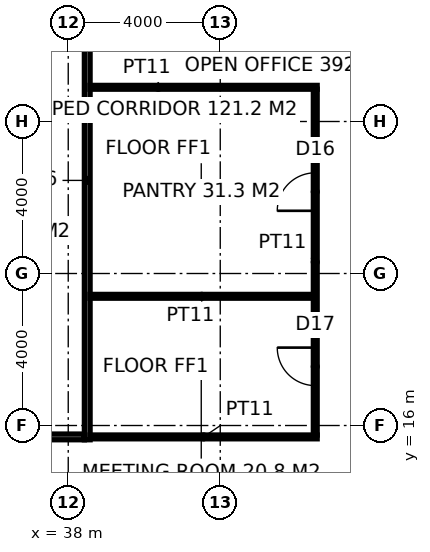
"""IFC4 building model, lengths in metres.
Left out: names, types, materials, properties, quantities, classifications, styles, units other than length and angle.
Written with IfcOpenShell. Run it as: python <this file> out.ifc"""

import sys

from ifc_helpers import new_model, si_unit, direction, frame, frame_2d, origin, place, context, subcontext, project, spatial, rectangle, extrude, element, fill, save


model = new_model("IFC4")
c1 = context("Model", 3, precision=1e-05, world=origin(), true_north=direction((0.0, 1.0)))
c2 = subcontext(c1, "Body", "Model", "MODEL_VIEW")
j1 = project(units=[si_unit("LENGTHUNIT", "METRE"), si_unit("PLANEANGLEUNIT", "RADIAN")], contexts=[c1])
p1 = place(None, origin())
s1 = spatial("IfcSite", under=j1, at=p1, CompositionType="ELEMENT")
p2 = place(p1, origin())
s2 = spatial("IfcBuilding", under=s1, at=p2, CompositionType="ELEMENT")
p3 = place(p2, frame((0.0, 0.0, 242.2)))
s3 = spatial("IfcBuildingStorey", under=s2, at=p3, CompositionType="ELEMENT", Elevation=242.2)
p4 = place(p3, frame((38.5, 15.625, 0.0), z_axis=(0.0, 0.0, 1.0), x_axis=(0.0, 1.0, 0.0)))
e1 = element("IfcWall", 1, at=p4, inside=s3, PredefinedType="PARTITIONING", context=c2, shape_type="SweptSolid", body=[
    extrude(rectangle(XDim=22.75, YDim=0.15, at=frame_2d((11.375, 0.0))), origin(), (0.0, 0.0, 1.0), 3.85),
])
p5 = place(p4, frame((10.475, 0.0, 0.0)))
e2 = element("IfcOpeningElement", 2, at=p5, cuts=e1, PredefinedType="OPENING", context=c2, shape_type="SweptSolid", body=[
    extrude(rectangle(XDim=1.8, YDim=2.4, at=frame_2d((0.9, 1.2))), frame((0.0, 0.085, 0.0), z_axis=(0.0, -1.0, 0.0), x_axis=(1.0, 0.0, 0.0)), (0.0, 0.0, 1.0), 0.17),
])
p6 = place(p3, frame((17.5, 15.7, 0.0), z_axis=(0.0, 0.0, 1.0), x_axis=(1.0, 0.0, 0.0)))
e3 = element("IfcWall", 3, at=p6, inside=s3, PredefinedType="PARTITIONING", context=c2, shape_type="SweptSolid", body=[
    extrude(rectangle(XDim=20.925, YDim=0.15, at=frame_2d((10.462, 0.0))), origin(), (0.0, 0.0, 1.0), 3.85),
])
p7 = place(p3, frame((38.575, 15.7, 0.0), z_axis=(0.0, 0.0, 1.0), x_axis=(1.0, 0.0, 0.0)))
e4 = element("IfcWall", 4, at=p7, inside=s3, PredefinedType="PARTITIONING", context=c2, shape_type="SweptSolid", body=[
    extrude(rectangle(XDim=5.975, YDim=0.1, at=frame_2d((2.988, 0.0))), origin(), (0.0, 0.0, 1.0), 3.85),
])
p8 = place(p3, frame((38.575, 19.4, 0.0), z_axis=(0.0, 0.0, 1.0), x_axis=(1.0, 0.0, 0.0)))
e5 = element("IfcWall", 5, at=p8, inside=s3, PredefinedType="PARTITIONING", context=c2, shape_type="SweptSolid", body=[
    extrude(rectangle(XDim=5.875, YDim=0.1, at=frame_2d((2.938, 0.0))), origin(), (0.0, 0.0, 1.0), 3.85),
])
p9 = place(p3, frame((38.575, 24.9, 0.0), z_axis=(0.0, 0.0, 1.0), x_axis=(1.0, 0.0, 0.0)))
e6 = element("IfcWall", 6, at=p9, inside=s3, PredefinedType="PARTITIONING", context=c2, shape_type="SweptSolid", body=[
    extrude(rectangle(XDim=5.975, YDim=0.1, at=frame_2d((2.988, 0.0))), origin(), (0.0, 0.0, 1.0), 3.85),
])
p10 = place(p3, frame((44.5, 15.75, 0.0), z_axis=(0.0, 0.0, 1.0), x_axis=(0.0, 1.0, 0.0)))
e7 = element("IfcWall", 7, at=p10, inside=s3, PredefinedType="PARTITIONING", context=c2, shape_type="SweptSolid", body=[
    extrude(rectangle(XDim=9.1, YDim=0.1, at=frame_2d((4.55, 0.0))), origin(), (0.0, 0.0, 1.0), 3.85),
])
p11 = place(p10, frame((1.3, 0.0, 0.0)))
e8 = element("IfcOpeningElement", 8, at=p11, cuts=e7, PredefinedType="OPENING", context=c2, shape_type="SweptSolid", body=[
    extrude(rectangle(XDim=1.0, YDim=2.2, at=frame_2d((0.5, 1.1))), frame((0.0, 0.06, 0.0), z_axis=(0.0, -1.0, 0.0), x_axis=(1.0, 0.0, 0.0)), (0.0, 0.0, 1.0), 0.12),
])
p12 = place(p10, frame((5.9, 0.0, 0.0)))
e9 = element("IfcOpeningElement", 9, at=p12, cuts=e7, PredefinedType="OPENING", context=c2, shape_type="SweptSolid", body=[
    extrude(rectangle(XDim=1.0, YDim=2.2, at=frame_2d((0.5, 1.1))), frame((0.0, 0.06, 0.0), z_axis=(0.0, -1.0, 0.0), x_axis=(1.0, 0.0, 0.0)), (0.0, 0.0, 1.0), 0.12),
])
p13 = place(p11, origin())
e10 = element("IfcDoor", 10, at=p13, inside=s3, OperationType="SINGLE_SWING_RIGHT", PredefinedType="DOOR", context=c2, shape_type="SweptSolid", body=[
    extrude(rectangle(XDim=1.0, YDim=2.2, at=frame_2d((0.5, 1.1))), frame((0.0, 0.025, 0.0), z_axis=(0.0, -1.0, 0.0), x_axis=(1.0, 0.0, 0.0)), (0.0, 0.0, 1.0), 0.05),
])
fill(e8, e10)
p14 = place(p12, origin())
e11 = element("IfcDoor", 11, at=p14, inside=s3, OperationType="SINGLE_SWING_LEFT", PredefinedType="DOOR", context=c2, shape_type="SweptSolid", body=[
    extrude(rectangle(XDim=1.0, YDim=2.2, at=frame_2d((0.5, 1.1))), frame((0.0, 0.025, 0.0), z_axis=(0.0, -1.0, 0.0), x_axis=(1.0, 0.0, 0.0)), (0.0, 0.0, 1.0), 0.05),
])
fill(e9, e11)
save(model, sys.argv[1])
